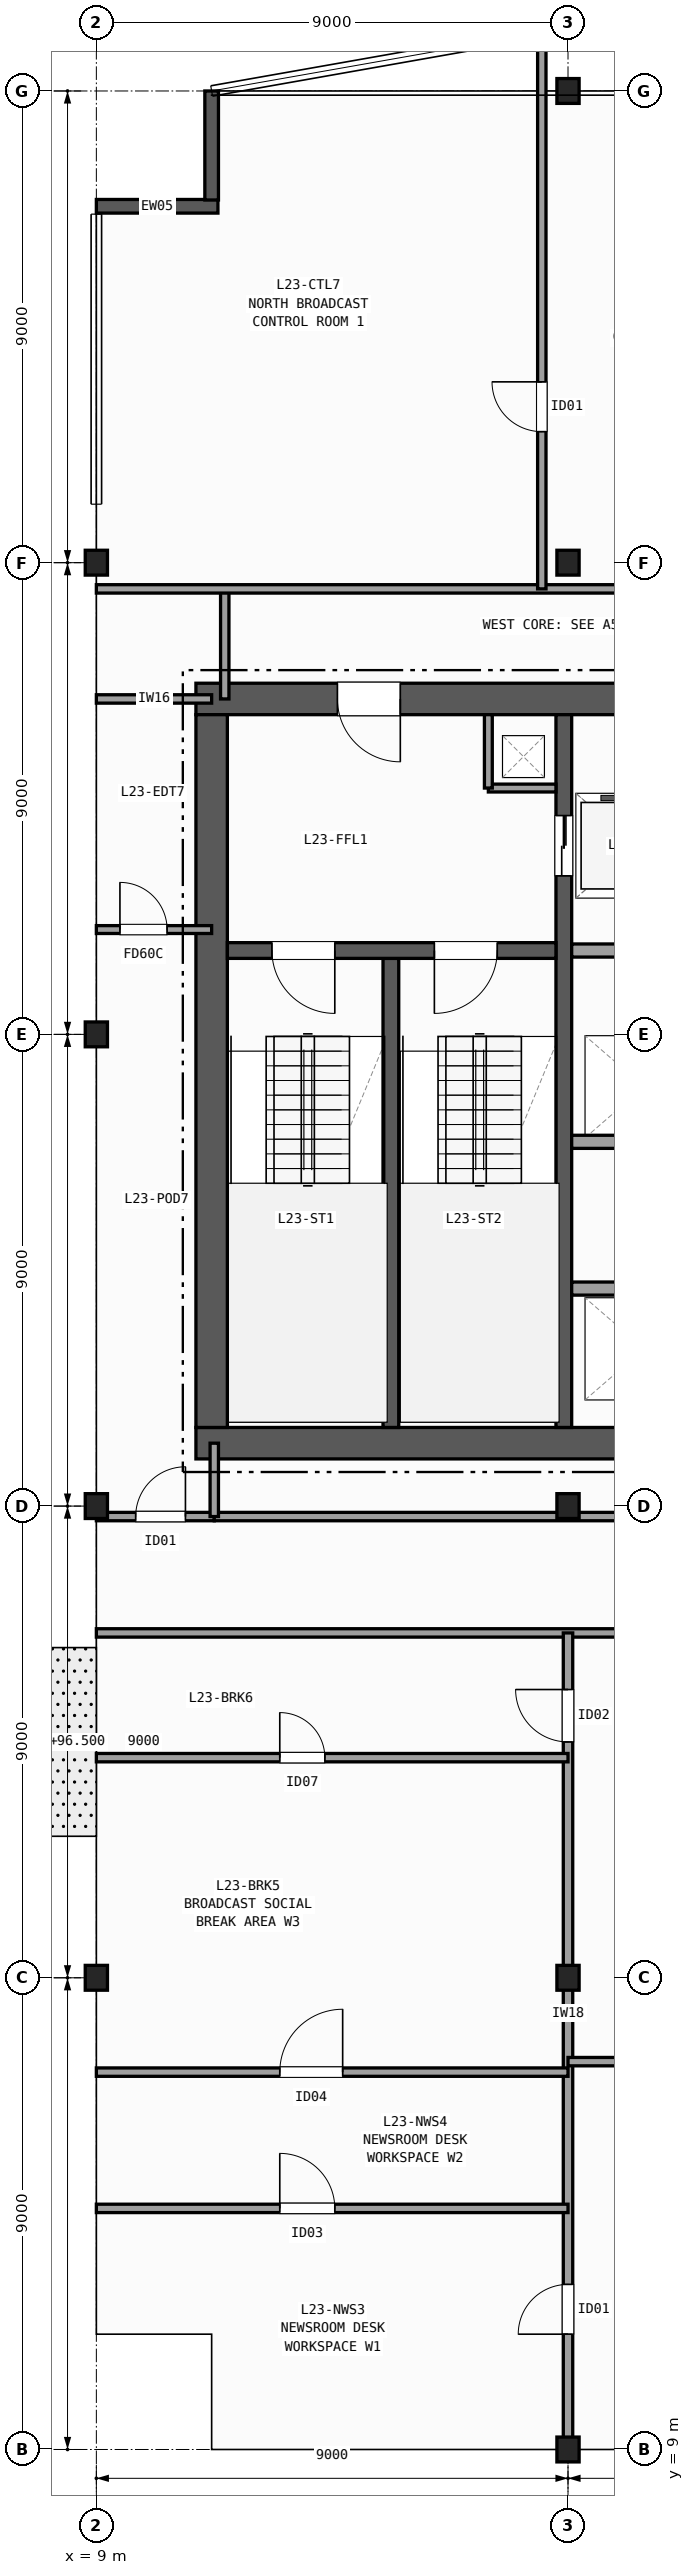
"""IFC4 building model, lengths in metres.
Left out: names, types, materials, properties, quantities, classifications, styles, units other than length and angle.
Written with IfcOpenShell. Run it as: python <this file> out.ifc"""

import sys

from ifc_helpers import new_model, si_unit, direction, frame, frame_2d, origin, origin_2d, place, context, subcontext, project, spatial, rectangle, i_section, extrude, element, fill, save


model = new_model("IFC4")
c1 = context("Model", 3, precision=1e-05, world=origin(), true_north=direction((0.0, 1.0)))
c2 = subcontext(c1, "Body", "Model", "MODEL_VIEW")
j1 = project(units=[si_unit("LENGTHUNIT", "METRE"), si_unit("PLANEANGLEUNIT", "RADIAN")], contexts=[c1])
p1 = place(None, origin())
s1 = spatial("IfcSite", under=j1, at=p1, CompositionType="ELEMENT")
p2 = place(p1, origin())
s2 = spatial("IfcBuilding", under=s1, at=p2, CompositionType="ELEMENT")
p3 = place(p2, frame((0.0, 0.0, 96.5)))
s3 = spatial("IfcBuildingStorey", under=s2, at=p3, CompositionType="ELEMENT", Elevation=96.5)
for number, where, z_axis, x_axis in (
    (1, (9.0, 18.0, 0.0), (0.0, 0.0, 1.0), (1.0, 0.0, 0.0)),
    (2, (9.0, 27.0, 0.0), (0.0, 0.0, 1.0), (1.0, 0.0, 0.0)),
    (3, (9.0, 36.0, 0.0), (0.0, 0.0, 1.0), (1.0, 0.0, 0.0)),
    (4, (9.0, 45.0, 0.0), (0.0, 0.0, 1.0), (1.0, 0.0, 0.0)),
    (5, (18.0, 9.0, 0.0), (0.0, 0.0, 1.0), (1.0, 0.0, 0.0)),
    (6, (18.0, 18.0, 0.0), (0.0, 0.0, 1.0), (1.0, 0.0, 0.0)),
    (7, (18.0, 27.0, 0.0), (0.0, 0.0, 1.0), (1.0, 0.0, 0.0)),
    (8, (18.0, 45.0, 0.0), (0.0, 0.0, 1.0), (1.0, 0.0, 0.0)),
    (9, (18.0, 54.0, 0.0), (0.0, 0.0, 1.0), (1.0, 0.0, 0.0)),
):
    element("IfcColumn", number, at=place(p3, frame(where, z_axis=z_axis, x_axis=x_axis)), inside=s3, PredefinedType="COLUMN", context=c2, shape_type="SweptSolid", body=[
        extrude(i_section(OverallWidth=0.424, OverallDepth=0.474, WebThickness=0.048, FlangeThickness=0.077, FilletRadius=0.015, at=origin_2d()), origin(), (0.0, 0.0, 1.0), 3.7),
    ])
p4 = place(p3, frame((9.0, 51.8, 0.0), z_axis=(0.0, 0.0, 1.0), x_axis=(1.0, 0.0, 0.0)))
e10 = element("IfcWall", 10, at=p4, inside=s3, PredefinedType="SOLIDWALL", context=c2, shape_type="SweptSolid", body=[
    extrude(rectangle(XDim=2.32, YDim=0.26, at=frame_2d((1.16, 0.0))), origin(), (0.0, 0.0, 1.0), 3.37),
])
p5 = place(p3, frame((11.2, 51.92, 0.0), z_axis=(0.0, 0.0, 1.0), x_axis=(0.0, 1.0, 0.0)))
e11 = element("IfcWall", 11, at=p5, inside=s3, PredefinedType="SOLIDWALL", context=c2, shape_type="SweptSolid", body=[
    extrude(rectangle(XDim=2.08, YDim=0.26, at=frame_2d((1.04, 0.0))), origin(), (0.0, 0.0, 1.0), 3.37),
])
p6 = place(p3, frame((10.9, 28.2, 0.0), z_axis=(0.0, 0.0, 1.0), x_axis=(1.0, 0.0, 0.0)))
e12 = element("IfcWall", 12, at=p6, inside=s3, PredefinedType="SHEAR", context=c2, shape_type="SweptSolid", body=[
    extrude(rectangle(XDim=14.0, YDim=0.6, at=frame_2d((7.0, 0.0))), origin(), (0.0, 0.0, 1.0), 3.37),
])
p7 = place(p3, frame((24.9, 42.4, 0.0), z_axis=(0.0, 0.0, 1.0), x_axis=(-1.0, 0.0, 0.0)))
e13 = element("IfcWall", 13, at=p7, inside=s3, PredefinedType="SHEAR", context=c2, shape_type="SweptSolid", body=[
    extrude(rectangle(XDim=14.0, YDim=0.6, at=frame_2d((7.0, 0.0))), origin(), (0.0, 0.0, 1.0), 3.37),
])
p8 = place(p7, frame((10.1, 0.0, 0.0)))
e14 = element("IfcOpeningElement", 14, at=p8, cuts=e13, PredefinedType="OPENING", context=c2, shape_type="SweptSolid", body=[
    extrude(rectangle(XDim=1.2, YDim=2.15, at=frame_2d((0.6, 1.075))), frame((0.0, 0.31, 0.0), z_axis=(0.0, -1.0, 0.0), x_axis=(1.0, 0.0, 0.0)), (0.0, 0.0, 1.0), 0.62),
])
p9 = place(p7, frame((3.05, 0.0, 0.0)))
e15 = element("IfcOpeningElement", 15, at=p9, cuts=e13, PredefinedType="OPENING", context=c2, shape_type="SweptSolid", body=[
    extrude(rectangle(XDim=0.9, YDim=2.1, at=frame_2d((0.45, 1.05))), frame((0.0, 0.31, 0.0), z_axis=(0.0, -1.0, 0.0), x_axis=(1.0, 0.0, 0.0)), (0.0, 0.0, 1.0), 0.62),
])
p10 = place(p3, frame((11.2, 42.1, 0.0), z_axis=(0.0, 0.0, 1.0), x_axis=(0.0, -1.0, 0.0)))
e16 = element("IfcWall", 16, at=p10, inside=s3, PredefinedType="SHEAR", context=c2, shape_type="SweptSolid", body=[
    extrude(rectangle(XDim=13.6, YDim=0.6, at=frame_2d((6.8, 0.0))), origin(), (0.0, 0.0, 1.0), 3.37),
])
p11 = place(p3, frame((14.62, 28.5, 0.0), z_axis=(0.0, 0.0, 1.0), x_axis=(0.0, 1.0, 0.0)))
e17 = element("IfcWall", 17, at=p11, inside=s3, PredefinedType="SHEAR", context=c2, shape_type="SweptSolid", body=[
    extrude(rectangle(XDim=8.95, YDim=0.3, at=frame_2d((4.475, 0.0))), origin(), (0.0, 0.0, 1.0), 3.37),
])
p12 = place(p3, frame((17.92, 42.1, 0.0), z_axis=(0.0, 0.0, 1.0), x_axis=(0.0, -1.0, 0.0)))
e18 = element("IfcWall", 18, at=p12, inside=s3, PredefinedType="SHEAR", context=c2, shape_type="SweptSolid", body=[
    extrude(rectangle(XDim=13.6, YDim=0.3, at=frame_2d((6.8, 0.0))), origin(), (0.0, 0.0, 1.0), 3.37),
])
p13 = place(p12, frame((1.925, 0.0, 0.0)))
e19 = element("IfcOpeningElement", 19, at=p13, cuts=e18, PredefinedType="OPENING", context=c2, shape_type="SweptSolid", body=[
    extrude(rectangle(XDim=1.15, YDim=2.15, at=frame_2d((0.575, 1.075))), frame((0.0, 0.16, 0.0), z_axis=(0.0, -1.0, 0.0), x_axis=(1.0, 0.0, 0.0)), (0.0, 0.0, 1.0), 0.32),
])
p14 = place(p3, frame((17.77, 37.6, 0.0), z_axis=(0.0, 0.0, 1.0), x_axis=(-1.0, 0.0, 0.0)))
e20 = element("IfcWall", 20, at=p14, inside=s3, PredefinedType="SHEAR", context=c2, shape_type="SweptSolid", body=[
    extrude(rectangle(XDim=6.27, YDim=0.3, at=frame_2d((3.135, 0.0))), origin(), (0.0, 0.0, 1.0), 3.37),
])
p15 = place(p14, frame((4.22, 0.0, 0.0)))
e21 = element("IfcOpeningElement", 21, at=p15, cuts=e20, PredefinedType="OPENING", context=c2, shape_type="SweptSolid", body=[
    extrude(rectangle(XDim=1.2, YDim=2.15, at=frame_2d((0.6, 1.075))), frame((0.0, 0.16, 0.0), z_axis=(0.0, -1.0, 0.0), x_axis=(1.0, 0.0, 0.0)), (0.0, 0.0, 1.0), 0.32),
])
p16 = place(p14, frame((1.12, 0.0, 0.0)))
e22 = element("IfcOpeningElement", 22, at=p16, cuts=e20, PredefinedType="OPENING", context=c2, shape_type="SweptSolid", body=[
    extrude(rectangle(XDim=1.2, YDim=2.15, at=frame_2d((0.6, 1.075))), frame((0.0, 0.16, 0.0), z_axis=(0.0, -1.0, 0.0), x_axis=(1.0, 0.0, 0.0)), (0.0, 0.0, 1.0), 0.32),
])
p17 = place(p3, frame((16.48, 40.7, 0.0), z_axis=(0.0, 0.0, 1.0), x_axis=(1.0, 0.0, 0.0)))
e23 = element("IfcWall", 23, at=p17, inside=s3, PredefinedType="PARTITIONING", context=c2, shape_type="SweptSolid", body=[
    extrude(rectangle(XDim=1.29, YDim=0.15, at=frame_2d((0.645, 0.0))), origin(), (0.0, 0.0, 1.0), 3.37),
])
p18 = place(p3, frame((16.48, 40.7, 0.0), z_axis=(0.0, 0.0, 1.0), x_axis=(0.0, 1.0, 0.0)))
e24 = element("IfcWall", 24, at=p18, inside=s3, PredefinedType="PARTITIONING", context=c2, shape_type="SweptSolid", body=[
    extrude(rectangle(XDim=1.4, YDim=0.15, at=frame_2d((0.7, 0.0))), origin(), (0.0, 0.0, 1.0), 3.37),
])
for number, where, z_axis, x_axis in (
    (25, (18.07, 37.6, 0.0), (0.0, 0.0, 1.0), (1.0, 0.0, 0.0)),
    (26, (18.07, 31.15, 0.0), (0.0, 0.0, 1.0), (1.0, 0.0, 0.0)),
    (27, (24.3, 33.95, 0.0), (0.0, 0.0, 1.0), (-1.0, 0.0, 0.0)),
):
    element("IfcWall", number, at=place(p3, frame(where, z_axis=z_axis, x_axis=x_axis)), inside=s3, PredefinedType="PARTITIONING", context=c2, shape_type="SweptSolid", body=[
        extrude(rectangle(XDim=6.23, YDim=0.25, at=frame_2d((3.115, 0.0))), origin(), (0.0, 0.0, 1.0), 3.37),
    ])
p19 = place(p3, frame((9.0, 26.8, 0.0), z_axis=(0.0, 0.0, 1.0), x_axis=(1.0, 0.0, 0.0)))
e28 = element("IfcWall", 28, at=p19, inside=s3, PredefinedType="PARTITIONING", context=c2, shape_type="SweptSolid", body=[
    extrude(rectangle(XDim=2.25, YDim=0.16, at=frame_2d((1.125, 0.0))), origin(), (0.0, 0.0, 1.0), 2.577),
])
p20 = place(p19, frame((0.75, 0.0, 0.0)))
e29 = element("IfcOpeningElement", 29, at=p20, cuts=e28, PredefinedType="OPENING", context=c2, shape_type="SweptSolid", body=[
    extrude(rectangle(XDim=0.95, YDim=2.1, at=frame_2d((0.475, 1.05))), frame((0.0, 0.09, 0.0), z_axis=(0.0, -1.0, 0.0), x_axis=(1.0, 0.0, 0.0)), (0.0, 0.0, 1.0), 0.18),
])
p21 = place(p3, frame((9.0, 42.4, 0.0), z_axis=(0.0, 0.0, 1.0), x_axis=(1.0, 0.0, 0.0)))
e30 = element("IfcWall", 30, at=p21, inside=s3, PredefinedType="PARTITIONING", context=c2, shape_type="SweptSolid", body=[
    extrude(rectangle(XDim=2.2, YDim=0.16, at=frame_2d((1.1, 0.0))), origin(), (0.0, 0.0, 1.0), 2.577),
])
p22 = place(p3, frame((11.45, 42.4, 0.0), z_axis=(0.0, 0.0, 1.0), x_axis=(0.0, 1.0, 0.0)))
e31 = element("IfcWall", 31, at=p22, inside=s3, PredefinedType="PARTITIONING", context=c2, shape_type="SweptSolid", body=[
    extrude(rectangle(XDim=2.1, YDim=0.16, at=frame_2d((1.05, 0.0))), origin(), (0.0, 0.0, 1.0), 3.37),
])
p23 = place(p3, frame((9.0, 38.0, 0.0), z_axis=(0.0, 0.0, 1.0), x_axis=(1.0, 0.0, 0.0)))
e32 = element("IfcWall", 32, at=p23, inside=s3, PredefinedType="PARTITIONING", context=c2, shape_type="SweptSolid", body=[
    extrude(rectangle(XDim=2.2, YDim=0.15, at=frame_2d((1.1, 0.0))), origin(), (0.0, 0.0, 1.0), 2.577),
])
p24 = place(p23, frame((0.45, 0.0, 0.0)))
e33 = element("IfcOpeningElement", 33, at=p24, cuts=e32, PredefinedType="OPENING", context=c2, shape_type="SweptSolid", body=[
    extrude(rectangle(XDim=0.9, YDim=2.1, at=frame_2d((0.45, 1.05))), frame((0.0, 0.085, 0.0), z_axis=(0.0, -1.0, 0.0), x_axis=(1.0, 0.0, 0.0)), (0.0, 0.0, 1.0), 0.17),
])
p25 = place(p3, frame((9.0, 24.58, 0.0), z_axis=(0.0, 0.0, 1.0), x_axis=(1.0, 0.0, 0.0)))
e34 = element("IfcWall", 34, at=p25, inside=s3, PredefinedType="PARTITIONING", context=c2, shape_type="SweptSolid", body=[
    extrude(rectangle(XDim=15.65, YDim=0.16, at=frame_2d((7.825, 0.0))), origin(), (0.0, 0.0, 1.0), 2.577),
])
p26 = place(p3, frame((11.25, 26.8, 0.0), z_axis=(0.0, 0.0, 1.0), x_axis=(1.0, 0.0, 0.0)))
e35 = element("IfcWall", 35, at=p26, inside=s3, PredefinedType="PARTITIONING", context=c2, shape_type="SweptSolid", body=[
    extrude(rectangle(XDim=13.4, YDim=0.16, at=frame_2d((6.7, 0.0))), origin(), (0.0, 0.0, 1.0), 2.739),
])
p27 = place(p26, frame((9.5, 0.0, 0.0)))
e36 = element("IfcOpeningElement", 36, at=p27, cuts=e35, PredefinedType="OPENING", context=c2, shape_type="SweptSolid", body=[
    extrude(rectangle(XDim=1.05, YDim=2.15, at=frame_2d((0.525, 1.075))), frame((0.0, 0.09, 0.0), z_axis=(0.0, -1.0, 0.0), x_axis=(1.0, 0.0, 0.0)), (0.0, 0.0, 1.0), 0.18),
])
p28 = place(p3, frame((11.25, 26.8, 0.0), z_axis=(0.0, 0.0, 1.0), x_axis=(0.0, 1.0, 0.0)))
e37 = element("IfcWall", 37, at=p28, inside=s3, PredefinedType="PARTITIONING", context=c2, shape_type="SweptSolid", body=[
    extrude(rectangle(XDim=1.4, YDim=0.16, at=frame_2d((0.7, 0.0))), origin(), (0.0, 0.0, 1.0), 2.739),
])
p29 = place(p3, frame((18.0, 9.0, 0.0), z_axis=(0.0, 0.0, 1.0), x_axis=(0.0, 1.0, 0.0)))
e38 = element("IfcWall", 38, at=p29, inside=s3, PredefinedType="PARTITIONING", context=c2, shape_type="SweptSolid", body=[
    extrude(rectangle(XDim=15.58, YDim=0.18, at=frame_2d((7.79, 0.0))), origin(), (0.0, 0.0, 1.0), 2.577),
])
p30 = place(p29, frame((2.2, 0.0, 0.0)))
e39 = element("IfcOpeningElement", 39, at=p30, cuts=e38, PredefinedType="OPENING", context=c2, shape_type="SweptSolid", body=[
    extrude(rectangle(XDim=0.95, YDim=2.1, at=frame_2d((0.475, 1.05))), frame((0.0, 0.1, 0.0), z_axis=(0.0, -1.0, 0.0), x_axis=(1.0, 0.0, 0.0)), (0.0, 0.0, 1.0), 0.2),
])
p31 = place(p29, frame((13.5, 0.0, 0.0)))
e40 = element("IfcOpeningElement", 40, at=p31, cuts=e38, PredefinedType="OPENING", context=c2, shape_type="SweptSolid", body=[
    extrude(rectangle(XDim=1.0, YDim=2.1, at=frame_2d((0.5, 1.05))), frame((0.0, 0.1, 0.0), z_axis=(0.0, -1.0, 0.0), x_axis=(1.0, 0.0, 0.0)), (0.0, 0.0, 1.0), 0.2),
])
p32 = place(p3, frame((18.0, 16.4, 0.0), z_axis=(0.0, 0.0, 1.0), x_axis=(1.0, 0.0, 0.0)))
e41 = element("IfcWall", 41, at=p32, inside=s3, PredefinedType="PARTITIONING", context=c2, shape_type="SweptSolid", body=[
    extrude(rectangle(XDim=6.65, YDim=0.16, at=frame_2d((3.325, 0.0))), origin(), (0.0, 0.0, 1.0), 2.742),
])
p33 = place(p3, frame((9.0, 13.6, 0.0), z_axis=(0.0, 0.0, 1.0), x_axis=(1.0, 0.0, 0.0)))
e42 = element("IfcWall", 42, at=p33, inside=s3, PredefinedType="PARTITIONING", context=c2, shape_type="SweptSolid", body=[
    extrude(rectangle(XDim=9.0, YDim=0.16, at=frame_2d((4.5, 0.0))), origin(), (0.0, 0.0, 1.0), 2.742),
])
p34 = place(p33, frame((3.5, 0.0, 0.0)))
e43 = element("IfcOpeningElement", 43, at=p34, cuts=e42, PredefinedType="OPENING", context=c2, shape_type="SweptSolid", body=[
    extrude(rectangle(XDim=1.05, YDim=2.15, at=frame_2d((0.525, 1.075))), frame((0.0, 0.09, 0.0), z_axis=(0.0, -1.0, 0.0), x_axis=(1.0, 0.0, 0.0)), (0.0, 0.0, 1.0), 0.18),
])
p35 = place(p3, frame((9.0, 16.2, 0.0), z_axis=(0.0, 0.0, 1.0), x_axis=(1.0, 0.0, 0.0)))
e44 = element("IfcWall", 44, at=p35, inside=s3, PredefinedType="PARTITIONING", context=c2, shape_type="SweptSolid", body=[
    extrude(rectangle(XDim=9.0, YDim=0.16, at=frame_2d((4.5, 0.0))), origin(), (0.0, 0.0, 1.0), 2.742),
])
p36 = place(p35, frame((3.5, 0.0, 0.0)))
e45 = element("IfcOpeningElement", 45, at=p36, cuts=e44, PredefinedType="OPENING", context=c2, shape_type="SweptSolid", body=[
    extrude(rectangle(XDim=1.2, YDim=2.15, at=frame_2d((0.6, 1.075))), frame((0.0, 0.09, 0.0), z_axis=(0.0, -1.0, 0.0), x_axis=(1.0, 0.0, 0.0)), (0.0, 0.0, 1.0), 0.18),
])
p37 = place(p3, frame((9.0, 22.2, 0.0), z_axis=(0.0, 0.0, 1.0), x_axis=(1.0, 0.0, 0.0)))
e46 = element("IfcWall", 46, at=p37, inside=s3, PredefinedType="PARTITIONING", context=c2, shape_type="SweptSolid", body=[
    extrude(rectangle(XDim=9.0, YDim=0.16, at=frame_2d((4.5, 0.0))), origin(), (0.0, 0.0, 1.0), 2.577),
])
p38 = place(p37, frame((3.5, 0.0, 0.0)))
e47 = element("IfcOpeningElement", 47, at=p38, cuts=e46, PredefinedType="OPENING", context=c2, shape_type="SweptSolid", body=[
    extrude(rectangle(XDim=0.86, YDim=2.05, at=frame_2d((0.43, 1.025))), frame((0.0, 0.09, 0.0), z_axis=(0.0, -1.0, 0.0), x_axis=(1.0, 0.0, 0.0)), (0.0, 0.0, 1.0), 0.18),
])
p39 = place(p3, frame((9.0, 44.5, 0.0), z_axis=(0.0, 0.0, 1.0), x_axis=(1.0, 0.0, 0.0)))
e48 = element("IfcWall", 48, at=p39, inside=s3, PredefinedType="PARTITIONING", context=c2, shape_type="SweptSolid", body=[
    extrude(rectangle(XDim=18.0, YDim=0.16, at=frame_2d((9.0, 0.0))), origin(), (0.0, 0.0, 1.0), 2.577),
])
p40 = place(p39, frame((10.65, 0.0, 0.0)))
e49 = element("IfcOpeningElement", 49, at=p40, cuts=e48, PredefinedType="OPENING", context=c2, shape_type="SweptSolid", body=[
    extrude(rectangle(XDim=1.0, YDim=2.1, at=frame_2d((0.5, 1.05))), frame((0.0, 0.09, 0.0), z_axis=(0.0, -1.0, 0.0), x_axis=(1.0, 0.0, 0.0)), (0.0, 0.0, 1.0), 0.18),
])
p41 = place(p39, frame((15.4, 0.0, 0.0)))
e50 = element("IfcOpeningElement", 50, at=p41, cuts=e48, PredefinedType="OPENING", context=c2, shape_type="SweptSolid", body=[
    extrude(rectangle(XDim=1.05, YDim=2.15, at=frame_2d((0.525, 1.075))), frame((0.0, 0.09, 0.0), z_axis=(0.0, -1.0, 0.0), x_axis=(1.0, 0.0, 0.0)), (0.0, 0.0, 1.0), 0.18),
])
p42 = place(p3, frame((17.5, 44.5, 0.0), z_axis=(0.0, 0.0, 1.0), x_axis=(0.0, 1.0, 0.0)))
e51 = element("IfcWall", 51, at=p42, inside=s3, PredefinedType="PARTITIONING", context=c2, shape_type="SweptSolid", body=[
    extrude(rectangle(XDim=10.612, YDim=0.16, at=frame_2d((5.306, 0.0))), origin(), (0.0, 0.0, 1.0), 3.37),
])
p43 = place(p42, frame((3.0, 0.0, 0.0)))
e52 = element("IfcOpeningElement", 52, at=p43, cuts=e51, PredefinedType="OPENING", context=c2, shape_type="SweptSolid", body=[
    extrude(rectangle(XDim=0.95, YDim=2.1, at=frame_2d((0.475, 1.05))), frame((0.0, 0.09, 0.0), z_axis=(0.0, -1.0, 0.0), x_axis=(1.0, 0.0, 0.0)), (0.0, 0.0, 1.0), 0.18),
])
p44 = place(p15, origin())
e53 = element("IfcDoor", 53, at=p44, inside=s3, OperationType="SINGLE_SWING_LEFT", PredefinedType="DOOR", context=c2, shape_type="SweptSolid", body=[
    extrude(rectangle(XDim=1.2, YDim=2.15, at=frame_2d((0.6, 1.075))), frame((0.0, 0.025, 0.0), z_axis=(0.0, -1.0, 0.0), x_axis=(1.0, 0.0, 0.0)), (0.0, 0.0, 1.0), 0.05),
])
fill(e21, e53)
p45 = place(p16, origin())
e54 = element("IfcDoor", 54, at=p45, inside=s3, OperationType="SINGLE_SWING_RIGHT", PredefinedType="DOOR", context=c2, shape_type="SweptSolid", body=[
    extrude(rectangle(XDim=1.2, YDim=2.15, at=frame_2d((0.6, 1.075))), frame((0.0, 0.025, 0.0), z_axis=(0.0, -1.0, 0.0), x_axis=(1.0, 0.0, 0.0)), (0.0, 0.0, 1.0), 0.05),
])
fill(e22, e54)
p46 = place(p8, origin())
e55 = element("IfcDoor", 55, at=p46, inside=s3, OperationType="SINGLE_SWING_LEFT", PredefinedType="DOOR", context=c2, shape_type="SweptSolid", body=[
    extrude(rectangle(XDim=1.2, YDim=2.15, at=frame_2d((0.6, 1.075))), frame((0.0, 0.025, 0.0), z_axis=(0.0, -1.0, 0.0), x_axis=(1.0, 0.0, 0.0)), (0.0, 0.0, 1.0), 0.05),
])
fill(e14, e55)
p47 = place(p13, origin())
e56 = element("IfcDoor", 56, at=p47, inside=s3, OperationType="DOUBLE_DOOR_SLIDING", PredefinedType="DOOR", context=c2, shape_type="SweptSolid", body=[
    extrude(rectangle(XDim=1.15, YDim=2.15, at=frame_2d((0.575, 1.075))), frame((0.0, 0.025, 0.0), z_axis=(0.0, -1.0, 0.0), x_axis=(1.0, 0.0, 0.0)), (0.0, 0.0, 1.0), 0.05),
])
fill(e19, e56)
p48 = place(p20, origin())
e57 = element("IfcDoor", 57, at=p48, inside=s3, OperationType="SINGLE_SWING_RIGHT", PredefinedType="DOOR", context=c2, shape_type="SweptSolid", body=[
    extrude(rectangle(XDim=0.95, YDim=2.1, at=frame_2d((0.475, 1.05))), frame((0.0, 0.025, 0.0), z_axis=(0.0, -1.0, 0.0), x_axis=(1.0, 0.0, 0.0)), (0.0, 0.0, 1.0), 0.05),
])
fill(e29, e57)
p49 = place(p24, origin())
e58 = element("IfcDoor", 58, at=p49, inside=s3, OperationType="SINGLE_SWING_LEFT", PredefinedType="DOOR", context=c2, shape_type="SweptSolid", body=[
    extrude(rectangle(XDim=0.9, YDim=2.1, at=frame_2d((0.45, 1.05))), frame((0.0, 0.025, 0.0), z_axis=(0.0, -1.0, 0.0), x_axis=(1.0, 0.0, 0.0)), (0.0, 0.0, 1.0), 0.05),
])
fill(e33, e58)
p50 = place(p30, origin())
e59 = element("IfcDoor", 59, at=p50, inside=s3, OperationType="SINGLE_SWING_LEFT", PredefinedType="DOOR", context=c2, shape_type="SweptSolid", body=[
    extrude(rectangle(XDim=0.95, YDim=2.1, at=frame_2d((0.475, 1.05))), frame((0.0, 0.025, 0.0), z_axis=(0.0, -1.0, 0.0), x_axis=(1.0, 0.0, 0.0)), (0.0, 0.0, 1.0), 0.05),
])
fill(e39, e59)
p51 = place(p31, origin())
e60 = element("IfcDoor", 60, at=p51, inside=s3, OperationType="SINGLE_SWING_RIGHT", PredefinedType="DOOR", context=c2, shape_type="SweptSolid", body=[
    extrude(rectangle(XDim=1.0, YDim=2.1, at=frame_2d((0.5, 1.05))), frame((0.0, 0.025, 0.0), z_axis=(0.0, -1.0, 0.0), x_axis=(1.0, 0.0, 0.0)), (0.0, 0.0, 1.0), 0.05),
])
fill(e40, e60)
p52 = place(p34, origin())
e61 = element("IfcDoor", 61, at=p52, inside=s3, OperationType="SINGLE_SWING_LEFT", PredefinedType="DOOR", context=c2, shape_type="SweptSolid", body=[
    extrude(rectangle(XDim=1.05, YDim=2.15, at=frame_2d((0.525, 1.075))), frame((0.0, 0.025, 0.0), z_axis=(0.0, -1.0, 0.0), x_axis=(1.0, 0.0, 0.0)), (0.0, 0.0, 1.0), 0.05),
])
fill(e43, e61)
p53 = place(p36, origin())
e62 = element("IfcDoor", 62, at=p53, inside=s3, OperationType="SINGLE_SWING_RIGHT", PredefinedType="DOOR", context=c2, shape_type="SweptSolid", body=[
    extrude(rectangle(XDim=1.2, YDim=2.15, at=frame_2d((0.6, 1.075))), frame((0.0, 0.025, 0.0), z_axis=(0.0, -1.0, 0.0), x_axis=(1.0, 0.0, 0.0)), (0.0, 0.0, 1.0), 0.05),
])
fill(e45, e62)
p54 = place(p38, origin())
e63 = element("IfcDoor", 63, at=p54, inside=s3, OperationType="SINGLE_SWING_LEFT", PredefinedType="DOOR", context=c2, shape_type="SweptSolid", body=[
    extrude(rectangle(XDim=0.86, YDim=2.05, at=frame_2d((0.43, 1.025))), frame((0.0, 0.025, 0.0), z_axis=(0.0, -1.0, 0.0), x_axis=(1.0, 0.0, 0.0)), (0.0, 0.0, 1.0), 0.05),
])
fill(e47, e63)
p55 = place(p43, origin())
e64 = element("IfcDoor", 64, at=p55, inside=s3, OperationType="SINGLE_SWING_RIGHT", PredefinedType="DOOR", context=c2, shape_type="SweptSolid", body=[
    extrude(rectangle(XDim=0.95, YDim=2.1, at=frame_2d((0.475, 1.05))), frame((0.0, 0.025, 0.0), z_axis=(0.0, -1.0, 0.0), x_axis=(1.0, 0.0, 0.0)), (0.0, 0.0, 1.0), 0.05),
])
fill(e52, e64)
save(model, sys.argv[1])
